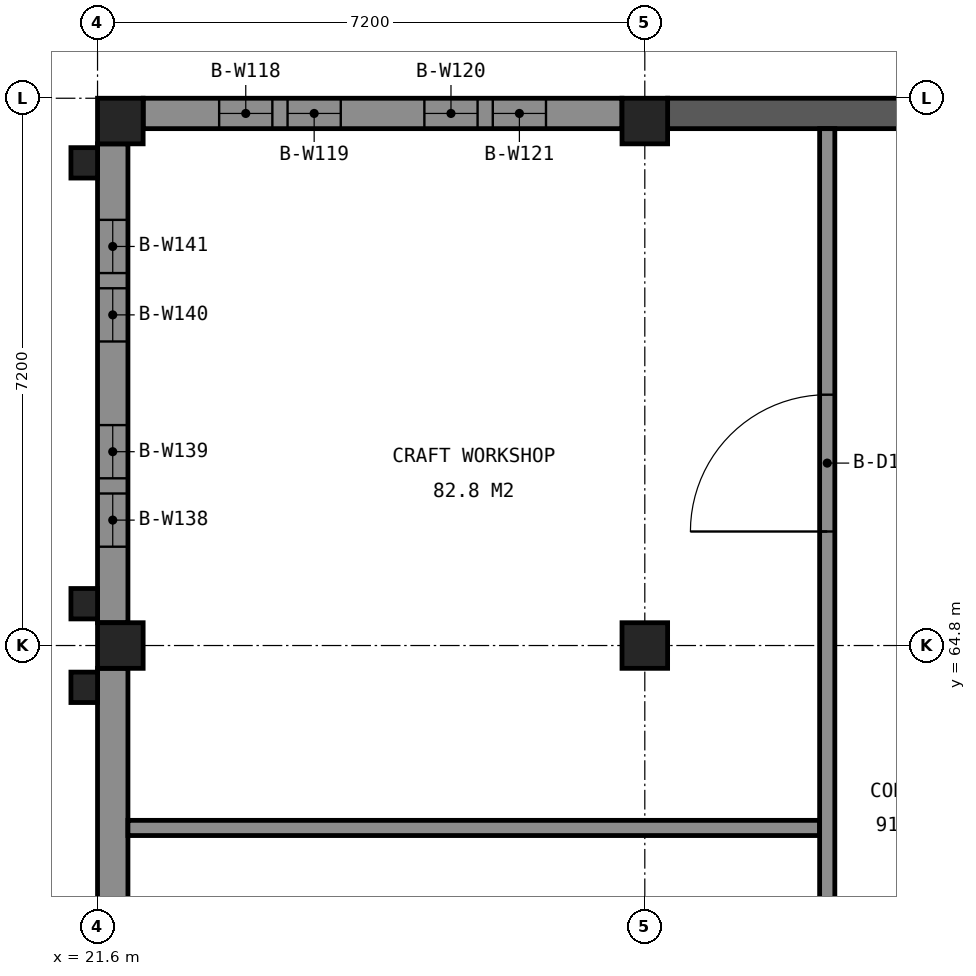
"""IFC4 building model, lengths in metres.
Left out: names, types, materials, properties, quantities, classifications, styles, units other than length and angle.
Written with IfcOpenShell. Run it as: python <this file> out.ifc"""

import sys

from ifc_helpers import new_model, si_unit, direction, frame, frame_2d, origin, origin_2d, place, context, subcontext, project, spatial, rectangle, extrude, element, fill, save


model = new_model("IFC4")
c1 = context("Model", 3, precision=1e-05, world=origin(), true_north=direction((0.0, 1.0)))
c2 = subcontext(c1, "Body", "Model", "MODEL_VIEW")
j1 = project(units=[si_unit("LENGTHUNIT", "METRE"), si_unit("PLANEANGLEUNIT", "RADIAN")], contexts=[c1])
p1 = place(None, origin())
s1 = spatial("IfcSite", under=j1, at=p1, CompositionType="ELEMENT")
p2 = place(p1, origin())
s2 = spatial("IfcBuilding", under=s1, at=p2, CompositionType="ELEMENT")
p3 = place(p2, frame((0.0, 0.0, 9.6)))
s3 = spatial("IfcBuildingStorey", under=s2, at=p3, CompositionType="ELEMENT", Elevation=9.6)
for number, where, z_axis, x_axis in (
    (1, (21.9, 64.8, 0.0), (0.0, 0.0, 1.0), (1.0, 0.0, 0.0)),
    (2, (21.9, 71.7, 0.0), (0.0, 0.0, 1.0), (1.0, 0.0, 0.0)),
    (3, (28.8, 64.8, 0.0), (0.0, 0.0, 1.0), (1.0, 0.0, 0.0)),
    (4, (28.8, 71.7, 0.0), (0.0, 0.0, 1.0), (1.0, 0.0, 0.0)),
):
    element("IfcColumn", number, at=place(p3, frame(where, z_axis=z_axis, x_axis=x_axis)), inside=s3, PredefinedType="COLUMN", context=c2, shape_type="SweptSolid", body=[
        extrude(rectangle(XDim=0.6, YDim=0.6, at=origin_2d()), origin(), (0.0, 0.0, 1.0), 4.8),
    ])
p4 = place(p3, frame((29.1, 71.8, 0.0), z_axis=(0.0, 0.0, 1.0), x_axis=(1.0, 0.0, 0.0)))
e5 = element("IfcWall", 5, at=p4, inside=s3, PredefinedType="SHEAR", context=c2, shape_type="SweptSolid", body=[
    extrude(rectangle(XDim=13.7, YDim=0.4, at=frame_2d((6.85, 0.0))), origin(), (0.0, 0.0, 1.0), 4.55),
])
p5 = place(p3, frame((22.2, 71.8, 0.0), z_axis=(0.0, 0.0, 1.0), x_axis=(1.0, 0.0, 0.0)))
e6 = element("IfcWall", 6, at=p5, inside=s3, PredefinedType="SOLIDWALL", context=c2, shape_type="SweptSolid", body=[
    extrude(rectangle(XDim=6.3, YDim=0.4, at=frame_2d((3.15, 0.0))), origin(), (0.0, 0.0, 1.0), 3.95),
])
p6 = place(p5, frame((1.0, 0.0, 0.9)))
e7 = element("IfcOpeningElement", 7, at=p6, cuts=e6, PredefinedType="OPENING", context=c2, shape_type="SweptSolid", body=[
    extrude(rectangle(XDim=0.7, YDim=2.4, at=frame_2d((0.35, 1.2))), frame((0.0, 0.21, 0.0), z_axis=(0.0, -1.0, 0.0), x_axis=(1.0, 0.0, 0.0)), (0.0, 0.0, 1.0), 0.42),
])
p7 = place(p5, frame((1.9, 0.0, 0.9)))
e8 = element("IfcOpeningElement", 8, at=p7, cuts=e6, PredefinedType="OPENING", context=c2, shape_type="SweptSolid", body=[
    extrude(rectangle(XDim=0.7, YDim=2.4, at=frame_2d((0.35, 1.2))), frame((0.0, 0.21, 0.0), z_axis=(0.0, -1.0, 0.0), x_axis=(1.0, 0.0, 0.0)), (0.0, 0.0, 1.0), 0.42),
])
p8 = place(p5, frame((3.7, 0.0, 0.9)))
e9 = element("IfcOpeningElement", 9, at=p8, cuts=e6, PredefinedType="OPENING", context=c2, shape_type="SweptSolid", body=[
    extrude(rectangle(XDim=0.7, YDim=2.4, at=frame_2d((0.35, 1.2))), frame((0.0, 0.21, 0.0), z_axis=(0.0, -1.0, 0.0), x_axis=(1.0, 0.0, 0.0)), (0.0, 0.0, 1.0), 0.42),
])
p9 = place(p5, frame((4.6, 0.0, 0.9)))
e10 = element("IfcOpeningElement", 10, at=p9, cuts=e6, PredefinedType="OPENING", context=c2, shape_type="SweptSolid", body=[
    extrude(rectangle(XDim=0.7, YDim=2.4, at=frame_2d((0.35, 1.2))), frame((0.0, 0.21, 0.0), z_axis=(0.0, -1.0, 0.0), x_axis=(1.0, 0.0, 0.0)), (0.0, 0.0, 1.0), 0.42),
])
p10 = place(p3, frame((21.8, 57.9, 0.0), z_axis=(0.0, 0.0, 1.0), x_axis=(0.0, 1.0, 0.0)))
e11 = element("IfcWall", 11, at=p10, inside=s3, PredefinedType="SOLIDWALL", context=c2, shape_type="SweptSolid", body=[
    extrude(rectangle(XDim=6.6, YDim=0.4, at=frame_2d((3.3, 0.0))), origin(), (0.0, 0.0, 1.0), 3.95),
])
p11 = place(p10, frame((1.375, 0.0, 0.9)))
e12 = element("IfcOpeningElement", 12, at=p11, cuts=e11, PredefinedType="OPENING", context=c2, shape_type="SweptSolid", body=[
    extrude(rectangle(XDim=0.7, YDim=2.4, at=frame_2d((0.35, 1.2))), frame((0.0, 0.21, 0.0), z_axis=(0.0, -1.0, 0.0), x_axis=(1.0, 0.0, 0.0)), (0.0, 0.0, 1.0), 0.42),
])
p12 = place(p10, frame((2.275, 0.0, 0.9)))
e13 = element("IfcOpeningElement", 13, at=p12, cuts=e11, PredefinedType="OPENING", context=c2, shape_type="SweptSolid", body=[
    extrude(rectangle(XDim=0.7, YDim=2.4, at=frame_2d((0.35, 1.2))), frame((0.0, 0.21, 0.0), z_axis=(0.0, -1.0, 0.0), x_axis=(1.0, 0.0, 0.0)), (0.0, 0.0, 1.0), 0.42),
])
p13 = place(p3, frame((21.8, 65.1, 0.0), z_axis=(0.0, 0.0, 1.0), x_axis=(0.0, 1.0, 0.0)))
e14 = element("IfcWall", 14, at=p13, inside=s3, PredefinedType="SOLIDWALL", context=c2, shape_type="SweptSolid", body=[
    extrude(rectangle(XDim=6.3, YDim=0.4, at=frame_2d((3.15, 0.0))), origin(), (0.0, 0.0, 1.0), 3.95),
])
p14 = place(p13, frame((1.0, 0.0, 0.9)))
e15 = element("IfcOpeningElement", 15, at=p14, cuts=e14, PredefinedType="OPENING", context=c2, shape_type="SweptSolid", body=[
    extrude(rectangle(XDim=0.7, YDim=2.4, at=frame_2d((0.35, 1.2))), frame((0.0, 0.21, 0.0), z_axis=(0.0, -1.0, 0.0), x_axis=(1.0, 0.0, 0.0)), (0.0, 0.0, 1.0), 0.42),
])
p15 = place(p13, frame((1.9, 0.0, 0.9)))
e16 = element("IfcOpeningElement", 16, at=p15, cuts=e14, PredefinedType="OPENING", context=c2, shape_type="SweptSolid", body=[
    extrude(rectangle(XDim=0.7, YDim=2.4, at=frame_2d((0.35, 1.2))), frame((0.0, 0.21, 0.0), z_axis=(0.0, -1.0, 0.0), x_axis=(1.0, 0.0, 0.0)), (0.0, 0.0, 1.0), 0.42),
])
p16 = place(p13, frame((3.7, 0.0, 0.9)))
e17 = element("IfcOpeningElement", 17, at=p16, cuts=e14, PredefinedType="OPENING", context=c2, shape_type="SweptSolid", body=[
    extrude(rectangle(XDim=0.7, YDim=2.4, at=frame_2d((0.35, 1.2))), frame((0.0, 0.21, 0.0), z_axis=(0.0, -1.0, 0.0), x_axis=(1.0, 0.0, 0.0)), (0.0, 0.0, 1.0), 0.42),
])
p17 = place(p13, frame((4.6, 0.0, 0.9)))
e18 = element("IfcOpeningElement", 18, at=p17, cuts=e14, PredefinedType="OPENING", context=c2, shape_type="SweptSolid", body=[
    extrude(rectangle(XDim=0.7, YDim=2.4, at=frame_2d((0.35, 1.2))), frame((0.0, 0.21, 0.0), z_axis=(0.0, -1.0, 0.0), x_axis=(1.0, 0.0, 0.0)), (0.0, 0.0, 1.0), 0.42),
])
for number, where, z_axis, x_axis in (
    (19, (21.425, 64.25, 0.0), (0.0, 0.0, 1.0), (1.0, 0.0, 0.0)),
    (20, (21.425, 65.35, 0.0), (0.0, 0.0, 1.0), (1.0, 0.0, 0.0)),
    (21, (21.425, 71.15, 0.0), (0.0, 0.0, 1.0), (1.0, 0.0, 0.0)),
):
    element("IfcColumn", number, at=place(p3, frame(where, z_axis=z_axis, x_axis=x_axis)), inside=s3, PredefinedType="COLUMN", context=c2, shape_type="SweptSolid", body=[
        extrude(rectangle(XDim=0.35, YDim=0.4, at=origin_2d()), origin(), (0.0, 0.0, 1.0), 4.8),
    ])
p18 = place(p3, frame((21.525, 58.35, -0.15), z_axis=(0.0, 0.0, 1.0), x_axis=(0.0, 1.0, 0.0)))
e22 = element("IfcWall", 22, at=p18, inside=s3, PredefinedType="SOLIDWALL", context=c2, shape_type="SweptSolid", body=[
    extrude(rectangle(XDim=5.7, YDim=0.15, at=frame_2d((2.85, 0.0))), origin(), (0.0, 0.0, 1.0), 0.3),
])
p19 = place(p3, frame((21.525, 64.45, -0.15), z_axis=(0.0, 0.0, 1.0), x_axis=(0.0, 1.0, 0.0)))
e23 = element("IfcWall", 23, at=p19, inside=s3, PredefinedType="SOLIDWALL", context=c2, shape_type="SweptSolid", body=[
    extrude(rectangle(XDim=0.7, YDim=0.15, at=frame_2d((0.35, 0.0))), origin(), (0.0, 0.0, 1.0), 0.3),
])
p20 = place(p3, frame((21.525, 65.55, -0.15), z_axis=(0.0, 0.0, 1.0), x_axis=(0.0, 1.0, 0.0)))
e24 = element("IfcWall", 24, at=p20, inside=s3, PredefinedType="SOLIDWALL", context=c2, shape_type="SweptSolid", body=[
    extrude(rectangle(XDim=5.4, YDim=0.15, at=frame_2d((2.7, 0.0))), origin(), (0.0, 0.0, 1.0), 0.3),
])
p21 = place(p3, frame((21.525, 71.35, -0.15), z_axis=(0.0, 0.0, 1.0), x_axis=(0.0, 1.0, 0.0)))
e25 = element("IfcWall", 25, at=p21, inside=s3, PredefinedType="SOLIDWALL", context=c2, shape_type="SweptSolid", body=[
    extrude(rectangle(XDim=0.65, YDim=0.15, at=frame_2d((0.325, 0.0))), origin(), (0.0, 0.0, 1.0), 0.3),
])
p22 = place(p3, frame((22.0, 62.4, 0.0), z_axis=(0.0, 0.0, 1.0), x_axis=(1.0, 0.0, 0.0)))
e26 = element("IfcWall", 26, at=p22, inside=s3, PredefinedType="PARTITIONING", context=c2, shape_type="SweptSolid", body=[
    extrude(rectangle(XDim=9.1, YDim=0.2, at=frame_2d((4.55, 0.0))), origin(), (0.0, 0.0, 1.0), 3.95),
])
p23 = place(p3, frame((31.2, 29.2, 0.0), z_axis=(0.0, 0.0, 1.0), x_axis=(0.0, 1.0, 0.0)))
e27 = element("IfcWall", 27, at=p23, inside=s3, PredefinedType="PARTITIONING", context=c2, shape_type="SweptSolid", body=[
    extrude(rectangle(XDim=42.4, YDim=0.2, at=frame_2d((21.2, 0.0))), origin(), (0.0, 0.0, 1.0), 3.95),
])
p24 = place(p23, frame((2.7, 0.0, 0.0)))
e28 = element("IfcOpeningElement", 28, at=p24, cuts=e27, PredefinedType="OPENING", context=c2, shape_type="SweptSolid", body=[
    extrude(rectangle(XDim=1.0, YDim=2.1, at=frame_2d((0.5, 1.05))), frame((0.0, 0.11, 0.0), z_axis=(0.0, -1.0, 0.0), x_axis=(1.0, 0.0, 0.0)), (0.0, 0.0, 1.0), 0.22),
])
p25 = place(p23, frame((9.9, 0.0, 0.0)))
e29 = element("IfcOpeningElement", 29, at=p25, cuts=e27, PredefinedType="OPENING", context=c2, shape_type="SweptSolid", body=[
    extrude(rectangle(XDim=1.0, YDim=2.1, at=frame_2d((0.5, 1.05))), frame((0.0, 0.11, 0.0), z_axis=(0.0, -1.0, 0.0), x_axis=(1.0, 0.0, 0.0)), (0.0, 0.0, 1.0), 0.22),
])
p26 = place(p23, frame((17.9, 0.0, 0.0)))
e30 = element("IfcOpeningElement", 30, at=p26, cuts=e27, PredefinedType="OPENING", context=c2, shape_type="SweptSolid", body=[
    extrude(rectangle(XDim=1.8, YDim=2.1, at=frame_2d((0.9, 1.05))), frame((0.0, 0.11, 0.0), z_axis=(0.0, -1.0, 0.0), x_axis=(1.0, 0.0, 0.0)), (0.0, 0.0, 1.0), 0.22),
])
p27 = place(p23, frame((27.5, 0.0, 0.0)))
e31 = element("IfcOpeningElement", 31, at=p27, cuts=e27, PredefinedType="OPENING", context=c2, shape_type="SweptSolid", body=[
    extrude(rectangle(XDim=1.8, YDim=2.1, at=frame_2d((0.9, 1.05))), frame((0.0, 0.11, 0.0), z_axis=(0.0, -1.0, 0.0), x_axis=(1.0, 0.0, 0.0)), (0.0, 0.0, 1.0), 0.22),
])
p28 = place(p23, frame((37.1, 0.0, 0.0)))
e32 = element("IfcOpeningElement", 32, at=p28, cuts=e27, PredefinedType="OPENING", context=c2, shape_type="SweptSolid", body=[
    extrude(rectangle(XDim=1.8, YDim=2.1, at=frame_2d((0.9, 1.05))), frame((0.0, 0.11, 0.0), z_axis=(0.0, -1.0, 0.0), x_axis=(1.0, 0.0, 0.0)), (0.0, 0.0, 1.0), 0.22),
])
p29 = place(p6, origin())
e33 = element("IfcWindow", 33, at=p29, inside=s3, PartitioningType="SINGLE_PANEL", PredefinedType="WINDOW", context=c2, shape_type="SweptSolid", body=[
    extrude(rectangle(XDim=0.7, YDim=2.4, at=frame_2d((0.35, 1.2))), frame((0.0, 0.03, 0.0), z_axis=(0.0, -1.0, 0.0), x_axis=(1.0, 0.0, 0.0)), (0.0, 0.0, 1.0), 0.06),
])
fill(e7, e33)
p30 = place(p7, origin())
e34 = element("IfcWindow", 34, at=p30, inside=s3, PartitioningType="SINGLE_PANEL", PredefinedType="WINDOW", context=c2, shape_type="SweptSolid", body=[
    extrude(rectangle(XDim=0.7, YDim=2.4, at=frame_2d((0.35, 1.2))), frame((0.0, 0.03, 0.0), z_axis=(0.0, -1.0, 0.0), x_axis=(1.0, 0.0, 0.0)), (0.0, 0.0, 1.0), 0.06),
])
fill(e8, e34)
p31 = place(p8, origin())
e35 = element("IfcWindow", 35, at=p31, inside=s3, PartitioningType="SINGLE_PANEL", PredefinedType="WINDOW", context=c2, shape_type="SweptSolid", body=[
    extrude(rectangle(XDim=0.7, YDim=2.4, at=frame_2d((0.35, 1.2))), frame((0.0, 0.03, 0.0), z_axis=(0.0, -1.0, 0.0), x_axis=(1.0, 0.0, 0.0)), (0.0, 0.0, 1.0), 0.06),
])
fill(e9, e35)
p32 = place(p9, origin())
e36 = element("IfcWindow", 36, at=p32, inside=s3, PartitioningType="SINGLE_PANEL", PredefinedType="WINDOW", context=c2, shape_type="SweptSolid", body=[
    extrude(rectangle(XDim=0.7, YDim=2.4, at=frame_2d((0.35, 1.2))), frame((0.0, 0.03, 0.0), z_axis=(0.0, -1.0, 0.0), x_axis=(1.0, 0.0, 0.0)), (0.0, 0.0, 1.0), 0.06),
])
fill(e10, e36)
p33 = place(p14, origin())
e37 = element("IfcWindow", 37, at=p33, inside=s3, PartitioningType="SINGLE_PANEL", PredefinedType="WINDOW", context=c2, shape_type="SweptSolid", body=[
    extrude(rectangle(XDim=0.7, YDim=2.4, at=frame_2d((0.35, 1.2))), frame((0.0, 0.03, 0.0), z_axis=(0.0, -1.0, 0.0), x_axis=(1.0, 0.0, 0.0)), (0.0, 0.0, 1.0), 0.06),
])
fill(e15, e37)
p34 = place(p15, origin())
e38 = element("IfcWindow", 38, at=p34, inside=s3, PartitioningType="SINGLE_PANEL", PredefinedType="WINDOW", context=c2, shape_type="SweptSolid", body=[
    extrude(rectangle(XDim=0.7, YDim=2.4, at=frame_2d((0.35, 1.2))), frame((0.0, 0.03, 0.0), z_axis=(0.0, -1.0, 0.0), x_axis=(1.0, 0.0, 0.0)), (0.0, 0.0, 1.0), 0.06),
])
fill(e16, e38)
p35 = place(p16, origin())
e39 = element("IfcWindow", 39, at=p35, inside=s3, PartitioningType="SINGLE_PANEL", PredefinedType="WINDOW", context=c2, shape_type="SweptSolid", body=[
    extrude(rectangle(XDim=0.7, YDim=2.4, at=frame_2d((0.35, 1.2))), frame((0.0, 0.03, 0.0), z_axis=(0.0, -1.0, 0.0), x_axis=(1.0, 0.0, 0.0)), (0.0, 0.0, 1.0), 0.06),
])
fill(e17, e39)
p36 = place(p17, origin())
e40 = element("IfcWindow", 40, at=p36, inside=s3, PartitioningType="SINGLE_PANEL", PredefinedType="WINDOW", context=c2, shape_type="SweptSolid", body=[
    extrude(rectangle(XDim=0.7, YDim=2.4, at=frame_2d((0.35, 1.2))), frame((0.0, 0.03, 0.0), z_axis=(0.0, -1.0, 0.0), x_axis=(1.0, 0.0, 0.0)), (0.0, 0.0, 1.0), 0.06),
])
fill(e18, e40)
p37 = place(p28, origin())
e41 = element("IfcDoor", 41, at=p37, inside=s3, OperationType="DOUBLE_DOOR_DOUBLE_SWING", PredefinedType="DOOR", context=c2, shape_type="SweptSolid", body=[
    extrude(rectangle(XDim=1.8, YDim=2.1, at=frame_2d((0.9, 1.05))), frame((0.0, 0.025, 0.0), z_axis=(0.0, -1.0, 0.0), x_axis=(1.0, 0.0, 0.0)), (0.0, 0.0, 1.0), 0.05),
])
fill(e32, e41)
save(model, sys.argv[1])
